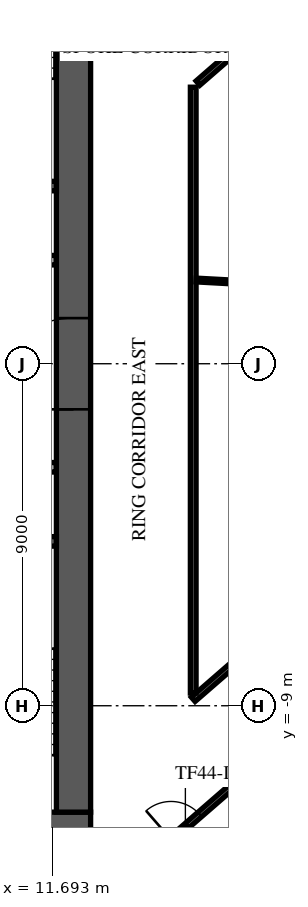
"""IFC4 building model, lengths in metres.
Left out: names, types, materials, properties, quantities, classifications, styles, units other than length and angle.
Written with IfcOpenShell. Run it as: python <this file> out.ifc"""

import sys

from ifc_helpers import new_model, si_unit, direction, frame, frame_2d, origin, place, context, subcontext, project, spatial, rectangle, extrude, element, fill, save


model = new_model("IFC4")
c1 = context("Model", 3, precision=1e-05, world=origin(), true_north=direction((0.0, 1.0)))
c2 = subcontext(c1, "Body", "Model", "MODEL_VIEW")
j1 = project(units=[si_unit("LENGTHUNIT", "METRE"), si_unit("PLANEANGLEUNIT", "RADIAN")], contexts=[c1])
p1 = place(None, origin())
s1 = spatial("IfcSite", under=j1, at=p1, CompositionType="ELEMENT")
p2 = place(p1, origin())
s2 = spatial("IfcBuilding", under=s1, at=p2, CompositionType="ELEMENT")
p3 = place(p2, frame((0.0, 0.0, 193.3)))
s3 = spatial("IfcBuildingStorey", under=s2, at=p3, CompositionType="ELEMENT", Elevation=193.3)
p4 = place(p3, frame((-12.7, -12.25, 0.0), z_axis=(0.0, 0.0, 1.0), x_axis=(1.0, 0.0, 0.0)))
e1 = element("IfcWall", 1, at=p4, inside=s3, PredefinedType="SHEAR", context=c2, shape_type="SweptSolid", body=[
    extrude(rectangle(XDim=25.4, YDim=0.9, at=frame_2d((12.7, 0.0))), origin(), (0.0, 0.0, 1.0), 3.62),
])
p5 = place(p4, frame((7.6, 0.0, 0.0)))
e2 = element("IfcOpeningElement", 2, at=p5, cuts=e1, PredefinedType="OPENING", context=c2, shape_type="SweptSolid", body=[
    extrude(rectangle(XDim=2.0, YDim=2.1, at=frame_2d((1.0, 1.05))), frame((0.0, 0.46, 0.0), z_axis=(0.0, -1.0, 0.0), x_axis=(1.0, 0.0, 0.0)), (0.0, 0.0, 1.0), 0.92),
])
p6 = place(p4, frame((17.725, 0.0, 0.0)))
e3 = element("IfcOpeningElement", 3, at=p6, cuts=e1, PredefinedType="OPENING", context=c2, shape_type="SweptSolid", body=[
    extrude(rectangle(XDim=1.2, YDim=2.1, at=frame_2d((0.6, 1.05))), frame((0.0, 0.46, 0.0), z_axis=(0.0, -1.0, 0.0), x_axis=(1.0, 0.0, 0.0)), (0.0, 0.0, 1.0), 0.92),
])
p7 = place(p4, frame((1.875, 0.0, 0.0)))
e4 = element("IfcOpeningElement", 4, at=p7, cuts=e1, PredefinedType="OPENING", context=c2, shape_type="SweptSolid", body=[
    extrude(rectangle(XDim=1.2, YDim=2.1, at=frame_2d((0.6, 1.05))), frame((0.0, 0.46, 0.0), z_axis=(0.0, -1.0, 0.0), x_axis=(1.0, 0.0, 0.0)), (0.0, 0.0, 1.0), 0.92),
])
p8 = place(p4, frame((22.325, 0.0, 0.0)))
e5 = element("IfcOpeningElement", 5, at=p8, cuts=e1, PredefinedType="OPENING", context=c2, shape_type="SweptSolid", body=[
    extrude(rectangle(XDim=1.2, YDim=2.1, at=frame_2d((0.6, 1.05))), frame((0.0, 0.46, 0.0), z_axis=(0.0, -1.0, 0.0), x_axis=(1.0, 0.0, 0.0)), (0.0, 0.0, 1.0), 0.92),
])
p9 = place(p3, frame((12.25, -11.8, 0.0), z_axis=(0.0, 0.0, 1.0), x_axis=(0.0, 1.0, 0.0)))
e6 = element("IfcWall", 6, at=p9, inside=s3, PredefinedType="SHEAR", context=c2, shape_type="SweptSolid", body=[
    extrude(rectangle(XDim=23.6, YDim=0.9, at=frame_2d((11.8, 0.0))), origin(), (0.0, 0.0, 1.0), 3.62),
])
p10 = place(p9, frame((10.6, 0.0, 0.0)))
e7 = element("IfcOpeningElement", 7, at=p10, cuts=e6, PredefinedType="OPENING", context=c2, shape_type="SweptSolid", body=[
    extrude(rectangle(XDim=2.4, YDim=2.4, at=frame_2d((1.2, 1.2))), frame((0.0, 0.46, 0.0), z_axis=(0.0, -1.0, 0.0), x_axis=(1.0, 0.0, 0.0)), (0.0, 0.0, 1.0), 0.92),
])
for number, where, z_axis, x_axis in (
    (8, (8.65, 4.675, 0.0), (0.0, 0.0, 1.0), (1.0, 0.0, 0.0)),
    (9, (8.65, -4.675, 0.0), (0.0, 0.0, 1.0), (1.0, 0.0, 0.0)),
):
    element("IfcWall", number, at=place(p3, frame(where, z_axis=z_axis, x_axis=x_axis)), inside=s3, PredefinedType="SOLIDWALL", context=c2, shape_type="SweptSolid", body=[
        extrude(rectangle(XDim=3.15, YDim=0.25, at=frame_2d((1.575, 0.0))), origin(), (0.0, 0.0, 1.0), 3.62),
    ])
p11 = place(p3, frame((5.63, -2.725, 0.0), z_axis=(0.0, 0.0, 1.0), x_axis=(1.0, 0.0, 0.0)))
e10 = element("IfcWall", 10, at=p11, inside=s3, PredefinedType="PARTITIONING", context=c2, shape_type="SweptSolid", body=[
    extrude(rectangle(XDim=6.165, YDim=0.25, at=frame_2d((3.083, 0.0))), origin(), (0.0, 0.0, 1.0), 3.62),
])
p12 = place(p11, frame((0.745, 0.0, 0.0)))
e11 = element("IfcOpeningElement", 11, at=p12, cuts=e10, PredefinedType="OPENING", context=c2, shape_type="SweptSolid", body=[
    extrude(rectangle(XDim=1.0, YDim=2.1, at=frame_2d((0.5, 1.05))), frame((0.0, 0.135, 0.0), z_axis=(0.0, -1.0, 0.0), x_axis=(1.0, 0.0, 0.0)), (0.0, 0.0, 1.0), 0.27),
])
p13 = place(p11, frame((3.92, 0.0, 0.0)))
e12 = element("IfcOpeningElement", 12, at=p13, cuts=e10, PredefinedType="OPENING", context=c2, shape_type="SweptSolid", body=[
    extrude(rectangle(XDim=0.9, YDim=2.1, at=frame_2d((0.45, 1.05))), frame((0.0, 0.135, 0.0), z_axis=(0.0, -1.0, 0.0), x_axis=(1.0, 0.0, 0.0)), (0.0, 0.0, 1.0), 0.27),
])
p14 = place(p3, frame((8.38, 2.725, 0.0), z_axis=(0.0, 0.0, 1.0), x_axis=(1.0, 0.0, 0.0)))
e13 = element("IfcWall", 13, at=p14, inside=s3, PredefinedType="PARTITIONING", context=c2, shape_type="SweptSolid", body=[
    extrude(rectangle(XDim=3.415, YDim=0.25, at=frame_2d((1.708, 0.0))), origin(), (0.0, 0.0, 1.0), 3.62),
])
p15 = place(p14, frame((1.17, 0.0, 0.0)))
e14 = element("IfcOpeningElement", 14, at=p15, cuts=e13, PredefinedType="OPENING", context=c2, shape_type="SweptSolid", body=[
    extrude(rectangle(XDim=0.9, YDim=2.1, at=frame_2d((0.45, 1.05))), frame((0.0, 0.135, 0.0), z_axis=(0.0, -1.0, 0.0), x_axis=(1.0, 0.0, 0.0)), (0.0, 0.0, 1.0), 0.27),
])
p16 = place(p3, frame((-2.286, -34.715, 0.0), z_axis=(0.0, 0.0, 1.0), x_axis=(0.754708272811, 0.656060532993, 0.0)))
e15 = element("IfcWall", 15, at=p16, inside=s3, PredefinedType="STANDARD", context=c2, shape_type="SweptSolid", body=[
    extrude(rectangle(XDim=49.0, YDim=0.6, at=frame_2d((24.5, 0.0))), origin(), (0.0, 0.0, 1.0), 3.62),
])
p17 = place(p16, frame((1.227, 0.0, 0.9)))
e16 = element("IfcOpeningElement", 16, at=p17, cuts=e15, PredefinedType="OPENING", context=c2, shape_type="SweptSolid", body=[
    extrude(rectangle(XDim=2.0, YDim=2.1, at=frame_2d((1.0, 1.05))), frame((0.0, 0.31, 0.0), z_axis=(0.0, -1.0, 0.0), x_axis=(1.0, 0.0, 0.0)), (0.0, 0.0, 1.0), 0.62),
])
p18 = place(p16, frame((5.682, 0.0, 0.9)))
e17 = element("IfcOpeningElement", 17, at=p18, cuts=e15, PredefinedType="OPENING", context=c2, shape_type="SweptSolid", body=[
    extrude(rectangle(XDim=2.0, YDim=2.1, at=frame_2d((1.0, 1.05))), frame((0.0, 0.31, 0.0), z_axis=(0.0, -1.0, 0.0), x_axis=(1.0, 0.0, 0.0)), (0.0, 0.0, 1.0), 0.62),
])
p19 = place(p16, frame((10.136, 0.0, 0.9)))
e18 = element("IfcOpeningElement", 18, at=p19, cuts=e15, PredefinedType="OPENING", context=c2, shape_type="SweptSolid", body=[
    extrude(rectangle(XDim=2.0, YDim=2.1, at=frame_2d((1.0, 1.05))), frame((0.0, 0.31, 0.0), z_axis=(0.0, -1.0, 0.0), x_axis=(1.0, 0.0, 0.0)), (0.0, 0.0, 1.0), 0.62),
])
p20 = place(p16, frame((14.591, 0.0, 0.9)))
e19 = element("IfcOpeningElement", 19, at=p20, cuts=e15, PredefinedType="OPENING", context=c2, shape_type="SweptSolid", body=[
    extrude(rectangle(XDim=2.0, YDim=2.1, at=frame_2d((1.0, 1.05))), frame((0.0, 0.31, 0.0), z_axis=(0.0, -1.0, 0.0), x_axis=(1.0, 0.0, 0.0)), (0.0, 0.0, 1.0), 0.62),
])
p21 = place(p16, frame((19.045, 0.0, 0.9)))
e20 = element("IfcOpeningElement", 20, at=p21, cuts=e15, PredefinedType="OPENING", context=c2, shape_type="SweptSolid", body=[
    extrude(rectangle(XDim=2.0, YDim=2.1, at=frame_2d((1.0, 1.05))), frame((0.0, 0.31, 0.0), z_axis=(0.0, -1.0, 0.0), x_axis=(1.0, 0.0, 0.0)), (0.0, 0.0, 1.0), 0.62),
])
p22 = place(p16, frame((23.5, 0.0, 0.9)))
e21 = element("IfcOpeningElement", 21, at=p22, cuts=e15, PredefinedType="OPENING", context=c2, shape_type="SweptSolid", body=[
    extrude(rectangle(XDim=2.0, YDim=2.1, at=frame_2d((1.0, 1.05))), frame((0.0, 0.31, 0.0), z_axis=(0.0, -1.0, 0.0), x_axis=(1.0, 0.0, 0.0)), (0.0, 0.0, 1.0), 0.62),
])
p23 = place(p16, frame((27.955, 0.0, 0.9)))
e22 = element("IfcOpeningElement", 22, at=p23, cuts=e15, PredefinedType="OPENING", context=c2, shape_type="SweptSolid", body=[
    extrude(rectangle(XDim=2.0, YDim=2.1, at=frame_2d((1.0, 1.05))), frame((0.0, 0.31, 0.0), z_axis=(0.0, -1.0, 0.0), x_axis=(1.0, 0.0, 0.0)), (0.0, 0.0, 1.0), 0.62),
])
p24 = place(p16, frame((32.409, 0.0, 0.9)))
e23 = element("IfcOpeningElement", 23, at=p24, cuts=e15, PredefinedType="OPENING", context=c2, shape_type="SweptSolid", body=[
    extrude(rectangle(XDim=2.0, YDim=2.1, at=frame_2d((1.0, 1.05))), frame((0.0, 0.31, 0.0), z_axis=(0.0, -1.0, 0.0), x_axis=(1.0, 0.0, 0.0)), (0.0, 0.0, 1.0), 0.62),
])
p25 = place(p16, frame((36.864, 0.0, 0.9)))
e24 = element("IfcOpeningElement", 24, at=p25, cuts=e15, PredefinedType="OPENING", context=c2, shape_type="SweptSolid", body=[
    extrude(rectangle(XDim=2.0, YDim=2.1, at=frame_2d((1.0, 1.05))), frame((0.0, 0.31, 0.0), z_axis=(0.0, -1.0, 0.0), x_axis=(1.0, 0.0, 0.0)), (0.0, 0.0, 1.0), 0.62),
])
p26 = place(p16, frame((41.318, 0.0, 0.9)))
e25 = element("IfcOpeningElement", 25, at=p26, cuts=e15, PredefinedType="OPENING", context=c2, shape_type="SweptSolid", body=[
    extrude(rectangle(XDim=2.0, YDim=2.1, at=frame_2d((1.0, 1.05))), frame((0.0, 0.31, 0.0), z_axis=(0.0, -1.0, 0.0), x_axis=(1.0, 0.0, 0.0)), (0.0, 0.0, 1.0), 0.62),
])
p27 = place(p16, frame((45.773, 0.0, 0.9)))
e26 = element("IfcOpeningElement", 26, at=p27, cuts=e15, PredefinedType="OPENING", context=c2, shape_type="SweptSolid", body=[
    extrude(rectangle(XDim=2.0, YDim=2.1, at=frame_2d((1.0, 1.05))), frame((0.0, 0.31, 0.0), z_axis=(0.0, -1.0, 0.0), x_axis=(1.0, 0.0, 0.0)), (0.0, 0.0, 1.0), 0.62),
])
p28 = place(p3, frame((35.208, 4.768, 0.0), z_axis=(0.0, 0.0, 1.0), x_axis=(-0.656058749455, 0.754709823219, 0.0)))
e27 = element("IfcWall", 27, at=p28, inside=s3, PredefinedType="STANDARD", context=c2, shape_type="SweptSolid", body=[
    extrude(rectangle(XDim=39.0, YDim=0.6, at=frame_2d((19.5, 0.0))), origin(), (0.0, 0.0, 1.0), 3.62),
])
p29 = place(p28, frame((1.217, 0.0, 0.9)))
e28 = element("IfcOpeningElement", 28, at=p29, cuts=e27, PredefinedType="OPENING", context=c2, shape_type="SweptSolid", body=[
    extrude(rectangle(XDim=1.9, YDim=2.1, at=frame_2d((0.95, 1.05))), frame((0.0, 0.31, 0.0), z_axis=(0.0, -1.0, 0.0), x_axis=(1.0, 0.0, 0.0)), (0.0, 0.0, 1.0), 0.62),
])
p30 = place(p28, frame((5.55, 0.0, 0.9)))
e29 = element("IfcOpeningElement", 29, at=p30, cuts=e27, PredefinedType="OPENING", context=c2, shape_type="SweptSolid", body=[
    extrude(rectangle(XDim=1.9, YDim=2.1, at=frame_2d((0.95, 1.05))), frame((0.0, 0.31, 0.0), z_axis=(0.0, -1.0, 0.0), x_axis=(1.0, 0.0, 0.0)), (0.0, 0.0, 1.0), 0.62),
])
p31 = place(p28, frame((9.883, 0.0, 0.9)))
e30 = element("IfcOpeningElement", 30, at=p31, cuts=e27, PredefinedType="OPENING", context=c2, shape_type="SweptSolid", body=[
    extrude(rectangle(XDim=1.9, YDim=2.1, at=frame_2d((0.95, 1.05))), frame((0.0, 0.31, 0.0), z_axis=(0.0, -1.0, 0.0), x_axis=(1.0, 0.0, 0.0)), (0.0, 0.0, 1.0), 0.62),
])
p32 = place(p28, frame((14.217, 0.0, 0.9)))
e31 = element("IfcOpeningElement", 31, at=p32, cuts=e27, PredefinedType="OPENING", context=c2, shape_type="SweptSolid", body=[
    extrude(rectangle(XDim=1.9, YDim=2.1, at=frame_2d((0.95, 1.05))), frame((0.0, 0.31, 0.0), z_axis=(0.0, -1.0, 0.0), x_axis=(1.0, 0.0, 0.0)), (0.0, 0.0, 1.0), 0.62),
])
p33 = place(p28, frame((18.55, 0.0, 0.9)))
e32 = element("IfcOpeningElement", 32, at=p33, cuts=e27, PredefinedType="OPENING", context=c2, shape_type="SweptSolid", body=[
    extrude(rectangle(XDim=1.9, YDim=2.1, at=frame_2d((0.95, 1.05))), frame((0.0, 0.31, 0.0), z_axis=(0.0, -1.0, 0.0), x_axis=(1.0, 0.0, 0.0)), (0.0, 0.0, 1.0), 0.62),
])
p34 = place(p28, frame((22.883, 0.0, 0.9)))
e33 = element("IfcOpeningElement", 33, at=p34, cuts=e27, PredefinedType="OPENING", context=c2, shape_type="SweptSolid", body=[
    extrude(rectangle(XDim=1.9, YDim=2.1, at=frame_2d((0.95, 1.05))), frame((0.0, 0.31, 0.0), z_axis=(0.0, -1.0, 0.0), x_axis=(1.0, 0.0, 0.0)), (0.0, 0.0, 1.0), 0.62),
])
p35 = place(p28, frame((27.217, 0.0, 0.9)))
e34 = element("IfcOpeningElement", 34, at=p35, cuts=e27, PredefinedType="OPENING", context=c2, shape_type="SweptSolid", body=[
    extrude(rectangle(XDim=1.9, YDim=2.1, at=frame_2d((0.95, 1.05))), frame((0.0, 0.31, 0.0), z_axis=(0.0, -1.0, 0.0), x_axis=(1.0, 0.0, 0.0)), (0.0, 0.0, 1.0), 0.62),
])
p36 = place(p28, frame((31.55, 0.0, 0.9)))
e35 = element("IfcOpeningElement", 35, at=p36, cuts=e27, PredefinedType="OPENING", context=c2, shape_type="SweptSolid", body=[
    extrude(rectangle(XDim=1.9, YDim=2.1, at=frame_2d((0.95, 1.05))), frame((0.0, 0.31, 0.0), z_axis=(0.0, -1.0, 0.0), x_axis=(1.0, 0.0, 0.0)), (0.0, 0.0, 1.0), 0.62),
])
p37 = place(p28, frame((35.883, 0.0, 0.9)))
e36 = element("IfcOpeningElement", 36, at=p37, cuts=e27, PredefinedType="OPENING", context=c2, shape_type="SweptSolid", body=[
    extrude(rectangle(XDim=1.9, YDim=2.1, at=frame_2d((0.95, 1.05))), frame((0.0, 0.31, 0.0), z_axis=(0.0, -1.0, 0.0), x_axis=(1.0, 0.0, 0.0)), (0.0, 0.0, 1.0), 0.62),
])
p38 = place(p3, frame((-1.0, -26.268, 0.0), z_axis=(0.0, 0.0, 1.0), x_axis=(0.754711356604, 0.656056985492, 0.0)))
e37 = element("IfcWall", 37, at=p38, inside=s3, PredefinedType="PARTITIONING", context=c2, shape_type="SweptSolid", body=[
    extrude(rectangle(XDim=36.052, YDim=0.15, at=frame_2d((18.026, 0.0))), origin(), (0.0, 0.0, 1.0), 3.17),
])
p39 = place(p38, frame((9.598, 0.0, 0.0)))
e38 = element("IfcOpeningElement", 38, at=p39, cuts=e37, PredefinedType="OPENING", context=c2, shape_type="SweptSolid", body=[
    extrude(rectangle(XDim=1.0, YDim=2.1, at=frame_2d((0.5, 1.05))), frame((0.0, 0.085, 0.0), z_axis=(0.0, -1.0, 0.0), x_axis=(1.0, 0.0, 0.0)), (0.0, 0.0, 1.0), 0.17),
])
p40 = place(p38, frame((20.957, 0.0, 0.0)))
e39 = element("IfcOpeningElement", 39, at=p40, cuts=e37, PredefinedType="OPENING", context=c2, shape_type="SweptSolid", body=[
    extrude(rectangle(XDim=1.0, YDim=2.1, at=frame_2d((0.5, 1.05))), frame((0.0, 0.085, 0.0), z_axis=(0.0, -1.0, 0.0), x_axis=(1.0, 0.0, 0.0)), (0.0, 0.0, 1.0), 0.17),
])
p41 = place(p38, frame((27.87, 0.0, 0.0)))
e40 = element("IfcOpeningElement", 40, at=p41, cuts=e37, PredefinedType="OPENING", context=c2, shape_type="SweptSolid", body=[
    extrude(rectangle(XDim=1.8, YDim=2.1, at=frame_2d((0.9, 1.05))), frame((0.0, 0.085, 0.0), z_axis=(0.0, -1.0, 0.0), x_axis=(1.0, 0.0, 0.0)), (0.0, 0.0, 1.0), 0.17),
])
p42 = place(p3, frame((8.103, 24.087, 0.0), z_axis=(0.0, 0.0, 1.0), x_axis=(0.656048444225, -0.754718781289, 0.0)))
e41 = element("IfcWall", 41, at=p42, inside=s3, PredefinedType="PARTITIONING", context=c2, shape_type="SweptSolid", body=[
    extrude(rectangle(XDim=25.8, YDim=0.15, at=frame_2d((12.9, 0.0))), origin(), (0.0, 0.0, 1.0), 3.17),
])
p43 = place(p3, frame((15.4, -8.831, 0.0), z_axis=(0.0, 0.0, 1.0), x_axis=(0.754715065445, 0.656052718911, 0.0)))
e42 = element("IfcWall", 42, at=p43, inside=s3, PredefinedType="PARTITIONING", context=c2, shape_type="SweptSolid", body=[
    extrude(rectangle(XDim=12.234, YDim=0.15, at=frame_2d((6.117, 0.0))), origin(), (0.0, 0.0, 1.0), 3.17),
])
p44 = place(p43, frame((8.8, 0.0, 0.0)))
e43 = element("IfcOpeningElement", 43, at=p44, cuts=e42, PredefinedType="OPENING", context=c2, shape_type="SweptSolid", body=[
    extrude(rectangle(XDim=1.0, YDim=2.1, at=frame_2d((0.5, 1.05))), frame((0.0, 0.085, 0.0), z_axis=(0.0, -1.0, 0.0), x_axis=(1.0, 0.0, 0.0)), (0.0, 0.0, 1.0), 0.17),
])
p45 = place(p3, frame((15.4, -8.667, 0.0), z_axis=(0.0, 0.0, 1.0), x_axis=(0.0, 1.0, 0.0)))
e44 = element("IfcWall", 44, at=p45, inside=s3, PredefinedType="PARTITIONING", context=c2, shape_type="SweptSolid", body=[
    extrude(rectangle(XDim=15.944, YDim=0.15, at=frame_2d((7.972, 0.0))), origin(), (0.0, 0.0, 1.0), 3.17),
])
p46 = place(p3, frame((15.524, 7.385, 0.0), z_axis=(0.0, 0.0, 1.0), x_axis=(0.754751247574, 0.656011093111, 0.0)))
e45 = element("IfcWall", 45, at=p46, inside=s3, PredefinedType="PARTITIONING", context=c2, shape_type="SweptSolid", body=[
    extrude(rectangle(XDim=2.957, YDim=0.15, at=frame_2d((1.479, 0.0))), origin(), (0.0, 0.0, 1.0), 3.17),
])
p47 = place(p3, frame((15.478, 2.203, 0.0), z_axis=(0.0, 0.0, 1.0), x_axis=(0.998532575908, -0.054154361321, 0.0)))
e46 = element("IfcWall", 46, at=p47, inside=s3, PredefinedType="PARTITIONING", context=c2, shape_type="SweptSolid", body=[
    extrude(rectangle(XDim=15.869, YDim=0.1, at=frame_2d((7.935, 0.0))), origin(), (0.0, 0.0, 1.0), 3.62),
])
p48 = place(p10, origin())
e47 = element("IfcDoor", 47, at=p48, inside=s3, OperationType="SINGLE_SWING_LEFT", PredefinedType="DOOR", context=c2, shape_type="SweptSolid", body=[
    extrude(rectangle(XDim=2.4, YDim=2.4, at=frame_2d((1.2, 1.2))), frame((0.0, 0.025, 0.0), z_axis=(0.0, -1.0, 0.0), x_axis=(1.0, 0.0, 0.0)), (0.0, 0.0, 1.0), 0.05),
])
fill(e7, e47)
p49 = place(p40, frame((1.0, 0.0, 0.0), z_axis=(0.0, 0.0, 1.0), x_axis=(-1.0, 0.0, 0.0)))
e48 = element("IfcDoor", 48, at=p49, inside=s3, OperationType="SINGLE_SWING_LEFT", PredefinedType="DOOR", context=c2, shape_type="SweptSolid", body=[
    extrude(rectangle(XDim=1.0, YDim=2.1, at=frame_2d((0.5, 1.05))), frame((0.0, 0.025, 0.0), z_axis=(0.0, -1.0, 0.0), x_axis=(1.0, 0.0, 0.0)), (0.0, 0.0, 1.0), 0.05),
])
fill(e39, e48)
save(model, sys.argv[1])
